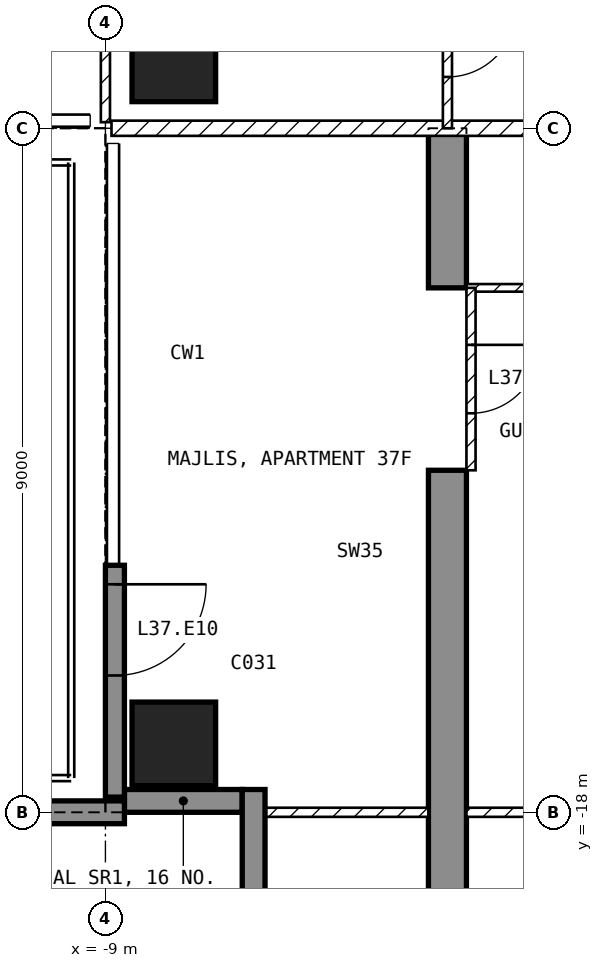
"""IFC4 building model, lengths in metres.
Left out: names, types, materials, properties, quantities, classifications, styles, units other than length and angle.
Written with IfcOpenShell. Run it as: python <this file> out.ifc"""

import sys

from ifc_helpers import new_model, si_unit, direction, frame, frame_2d, origin, origin_2d, place, context, subcontext, project, spatial, polyline, rectangle, outline, extrude, element, fill, save


model = new_model("IFC4")
c1 = context("Model", 3, precision=1e-05, world=origin(), true_north=direction((0.0, 1.0)))
c2 = subcontext(c1, "Body", "Model", "MODEL_VIEW")
j1 = project(units=[si_unit("LENGTHUNIT", "METRE"), si_unit("PLANEANGLEUNIT", "RADIAN")], contexts=[c1])
p1 = place(None, origin())
s1 = spatial("IfcSite", under=j1, at=p1, CompositionType="ELEMENT")
p2 = place(p1, origin())
s2 = spatial("IfcBuilding", under=s1, at=p2, CompositionType="ELEMENT")
p3 = place(p2, frame((0.0, 0.0, 151.4)))
s3 = spatial("IfcBuildingStorey", under=s2, at=p3, CompositionType="ELEMENT", Elevation=151.4)
for number, where, z_axis, x_axis in (
    (1, (-8.1, -17.1, -0.25), (0.0, 0.0, 1.0), (1.0, 0.0, 0.0)),
    (2, (-8.1, -8.1, -0.25), (0.0, 0.0, 1.0), (1.0, 0.0, 0.0)),
):
    element("IfcColumn", number, at=place(p3, frame(where, z_axis=z_axis, x_axis=x_axis)), inside=s3, PredefinedType="COLUMN", context=c2, shape_type="SweptSolid", body=[
        extrude(rectangle(XDim=1.1, YDim=1.1, at=origin_2d()), origin(), (0.0, 0.0, 1.0), 3.45),
    ])
p4 = place(p3, frame((-4.75, -20.15, -0.25), z_axis=(1.0, 0.0, 0.0), x_axis=(0.0, 1.0, 0.0)))
e3 = element("IfcWall", 3, at=p4, inside=s3, PredefinedType="SHEAR", context=c2, shape_type="SweptSolid", body=[
    extrude(outline(polyline([(0.0, 0.0), (6.65, 0.0), (6.65, 2.65), (9.05, 2.65), (9.05, 0.0), (11.15, 0.0), (11.15, 3.45), (0.0, 3.45), (0.0, 0.0)])), origin(), (0.0, 0.0, 1.0), 0.5),
])
p5 = place(p3, frame((-8.875, -14.75, 0.0), z_axis=(0.0, 0.0, 1.0), x_axis=(0.0, -1.0, 0.0)))
e4 = element("IfcWall", 4, at=p5, inside=s3, PredefinedType="SOLIDWALL", context=c2, shape_type="SweptSolid", body=[
    extrude(rectangle(XDim=3.05, YDim=0.25, at=frame_2d((1.525, 0.0))), origin(), (0.0, 0.0, 1.0), 3.2),
])
p6 = place(p5, frame((0.25, 0.0, 0.0)))
e5 = element("IfcOpeningElement", 5, at=p6, cuts=e4, PredefinedType="OPENING", context=c2, shape_type="SweptSolid", body=[
    extrude(rectangle(XDim=1.2, YDim=2.4, at=frame_2d((0.6, 1.2))), frame((0.0, 0.135, 0.0), z_axis=(0.0, -1.0, 0.0), x_axis=(1.0, 0.0, 0.0)), (0.0, 0.0, 1.0), 0.27),
])
p7 = place(p3, frame((-8.75, -17.85, 0.0), z_axis=(0.0, 0.0, 1.0), x_axis=(1.0, 0.0, 0.0)))
e6 = element("IfcWall", 6, at=p7, inside=s3, PredefinedType="SOLIDWALL", context=c2, shape_type="SweptSolid", body=[
    extrude(rectangle(XDim=1.55, YDim=0.3, at=frame_2d((0.775, 0.0))), origin(), (0.0, 0.0, 1.0), 3.2),
])
p8 = place(p3, frame((-7.05, -17.7, 0.0), z_axis=(0.0, 0.0, 1.0), x_axis=(0.0, -1.0, 0.0)))
e7 = element("IfcWall", 7, at=p8, inside=s3, PredefinedType="SOLIDWALL", context=c2, shape_type="SweptSolid", body=[
    extrude(rectangle(XDim=1.8, YDim=0.3, at=frame_2d((0.9, 0.0))), origin(), (0.0, 0.0, 1.0), 3.2),
])
p9 = place(p3, frame((-8.75, -18.0, 0.0), z_axis=(0.0, 0.0, 1.0), x_axis=(-1.0, 0.0, 0.0)))
e8 = element("IfcWall", 8, at=p9, inside=s3, PredefinedType="SOLIDWALL", context=c2, shape_type="SweptSolid", body=[
    extrude(rectangle(XDim=2.99, YDim=0.3, at=frame_2d((1.495, 0.0))), origin(), (0.0, 0.0, 1.0), 3.2),
])
p10 = place(p3, frame((8.92, -9.0, 0.0), z_axis=(0.0, 0.0, 1.0), x_axis=(-1.0, 0.0, 0.0)))
e9 = element("IfcWall", 9, at=p10, inside=s3, PredefinedType="PARTITIONING", context=c2, shape_type="SweptSolid", body=[
    extrude(rectangle(XDim=17.84, YDim=0.2, at=frame_2d((8.92, 0.0))), origin(), (0.0, 0.0, 1.0), 3.2),
])
p11 = place(p10, frame((8.42, 0.0, 0.0)))
e10 = element("IfcOpeningElement", 10, at=p11, cuts=e9, PredefinedType="OPENING", context=c2, shape_type="SweptSolid", body=[
    extrude(rectangle(XDim=1.0, YDim=2.1, at=frame_2d((0.5, 1.05))), frame((0.0, 0.11, 0.0), z_axis=(0.0, -1.0, 0.0), x_axis=(1.0, 0.0, 0.0)), (0.0, 0.0, 1.0), 0.22),
])
p12 = place(p3, frame((-9.0, -1.3, 0.0), z_axis=(0.0, 0.0, 1.0), x_axis=(0.0, -1.0, 0.0)))
e11 = element("IfcWall", 11, at=p12, inside=s3, PredefinedType="PARTITIONING", context=c2, shape_type="SweptSolid", body=[
    extrude(rectangle(XDim=7.62, YDim=0.12, at=frame_2d((3.81, 0.0))), origin(), (0.0, 0.0, 1.0), 3.2),
])
p13 = place(p12, frame((4.2, 0.0, 0.0)))
e12 = element("IfcOpeningElement", 12, at=p13, cuts=e11, PredefinedType="OPENING", context=c2, shape_type="SweptSolid", body=[
    extrude(rectangle(XDim=0.9, YDim=2.1, at=frame_2d((0.45, 1.05))), frame((0.0, 0.07, 0.0), z_axis=(0.0, -1.0, 0.0), x_axis=(1.0, 0.0, 0.0)), (0.0, 0.0, 1.0), 0.14),
])
p14 = place(p3, frame((-4.5, -6.75, 0.0), z_axis=(0.0, 0.0, 1.0), x_axis=(0.0, -1.0, 0.0)))
e13 = element("IfcWall", 13, at=p14, inside=s3, PredefinedType="PARTITIONING", context=c2, shape_type="SweptSolid", body=[
    extrude(rectangle(XDim=2.25, YDim=0.12, at=frame_2d((1.125, 0.0))), origin(), (0.0, 0.0, 1.0), 3.2),
])
p15 = place(p14, frame((0.675, 0.0, 0.0)))
e14 = element("IfcOpeningElement", 14, at=p15, cuts=e13, PredefinedType="OPENING", context=c2, shape_type="SweptSolid", body=[
    extrude(rectangle(XDim=0.9, YDim=2.1, at=frame_2d((0.45, 1.05))), frame((0.0, 0.07, 0.0), z_axis=(0.0, -1.0, 0.0), x_axis=(1.0, 0.0, 0.0)), (0.0, 0.0, 1.0), 0.14),
])
p16 = place(p3, frame((-2.1, -11.1, 0.0), z_axis=(0.0, 0.0, 1.0), x_axis=(-1.0, 0.0, 0.0)))
e15 = element("IfcWall", 15, at=p16, inside=s3, PredefinedType="PARTITIONING", context=c2, shape_type="SweptSolid", body=[
    extrude(rectangle(XDim=2.15, YDim=0.1, at=frame_2d((1.075, 0.0))), origin(), (0.0, 0.0, 1.0), 3.2),
])
p17 = place(p3, frame((4.25, -18.0, 0.0), z_axis=(0.0, 0.0, 1.0), x_axis=(-1.0, 0.0, 0.0)))
e16 = element("IfcWall", 16, at=p17, inside=s3, PredefinedType="PARTITIONING", context=c2, shape_type="SweptSolid", body=[
    extrude(rectangle(XDim=8.5, YDim=0.12, at=frame_2d((4.25, 0.0))), origin(), (0.0, 0.0, 1.0), 3.2),
])
p18 = place(p17, frame((5.675, 0.0, 0.0)))
e17 = element("IfcOpeningElement", 17, at=p18, cuts=e16, PredefinedType="OPENING", context=c2, shape_type="SweptSolid", body=[
    extrude(rectangle(XDim=0.9, YDim=2.1, at=frame_2d((0.45, 1.05))), frame((0.0, 0.07, 0.0), z_axis=(0.0, -1.0, 0.0), x_axis=(1.0, 0.0, 0.0)), (0.0, 0.0, 1.0), 0.14),
])
p19 = place(p3, frame((-4.75, -18.0, 0.0), z_axis=(0.0, 0.0, 1.0), x_axis=(-1.0, 0.0, 0.0)))
e18 = element("IfcWall", 18, at=p19, inside=s3, PredefinedType="PARTITIONING", context=c2, shape_type="SweptSolid", body=[
    extrude(rectangle(XDim=2.37, YDim=0.12, at=frame_2d((1.185, 0.0))), origin(), (0.0, 0.0, 1.0), 3.2),
])
p20 = place(p3, frame((-4.19, -11.1, 0.0), z_axis=(0.0, 0.0, 1.0), x_axis=(0.0, -1.0, 0.0)))
e19 = element("IfcWall", 19, at=p20, inside=s3, PredefinedType="PARTITIONING", context=c2, shape_type="SweptSolid", body=[
    extrude(rectangle(XDim=2.4, YDim=0.12, at=frame_2d((1.2, 0.0))), origin(), (0.0, 0.0, 1.0), 2.4),
])
p21 = place(p20, frame((0.75, 0.0, 0.0)))
e20 = element("IfcOpeningElement", 20, at=p21, cuts=e19, PredefinedType="OPENING", context=c2, shape_type="SweptSolid", body=[
    extrude(rectangle(XDim=0.9, YDim=2.1, at=frame_2d((0.45, 1.05))), frame((0.0, 0.07, 0.0), z_axis=(0.0, -1.0, 0.0), x_axis=(1.0, 0.0, 0.0)), (0.0, 0.0, 1.0), 0.14),
])
p22 = place(p6, origin())
e21 = element("IfcDoor", 21, at=p22, inside=s3, OperationType="SINGLE_SWING_LEFT", PredefinedType="DOOR", context=c2, shape_type="SweptSolid", body=[
    extrude(rectangle(XDim=1.2, YDim=2.4, at=frame_2d((0.6, 1.2))), frame((0.0, 0.025, 0.0), z_axis=(0.0, -1.0, 0.0), x_axis=(1.0, 0.0, 0.0)), (0.0, 0.0, 1.0), 0.05),
])
fill(e5, e21)
p23 = place(p15, origin())
e22 = element("IfcDoor", 22, at=p23, inside=s3, OperationType="SINGLE_SWING_LEFT", PredefinedType="DOOR", context=c2, shape_type="SweptSolid", body=[
    extrude(rectangle(XDim=0.9, YDim=2.1, at=frame_2d((0.45, 1.05))), frame((0.0, 0.025, 0.0), z_axis=(0.0, -1.0, 0.0), x_axis=(1.0, 0.0, 0.0)), (0.0, 0.0, 1.0), 0.05),
])
fill(e14, e22)
p24 = place(p21, origin())
e23 = element("IfcDoor", 23, at=p24, inside=s3, OperationType="SINGLE_SWING_LEFT", PredefinedType="DOOR", context=c2, shape_type="SweptSolid", body=[
    extrude(rectangle(XDim=0.9, YDim=2.1, at=frame_2d((0.45, 1.05))), frame((0.0, 0.025, 0.0), z_axis=(0.0, -1.0, 0.0), x_axis=(1.0, 0.0, 0.0)), (0.0, 0.0, 1.0), 0.05),
])
fill(e20, e23)
save(model, sys.argv[1])
